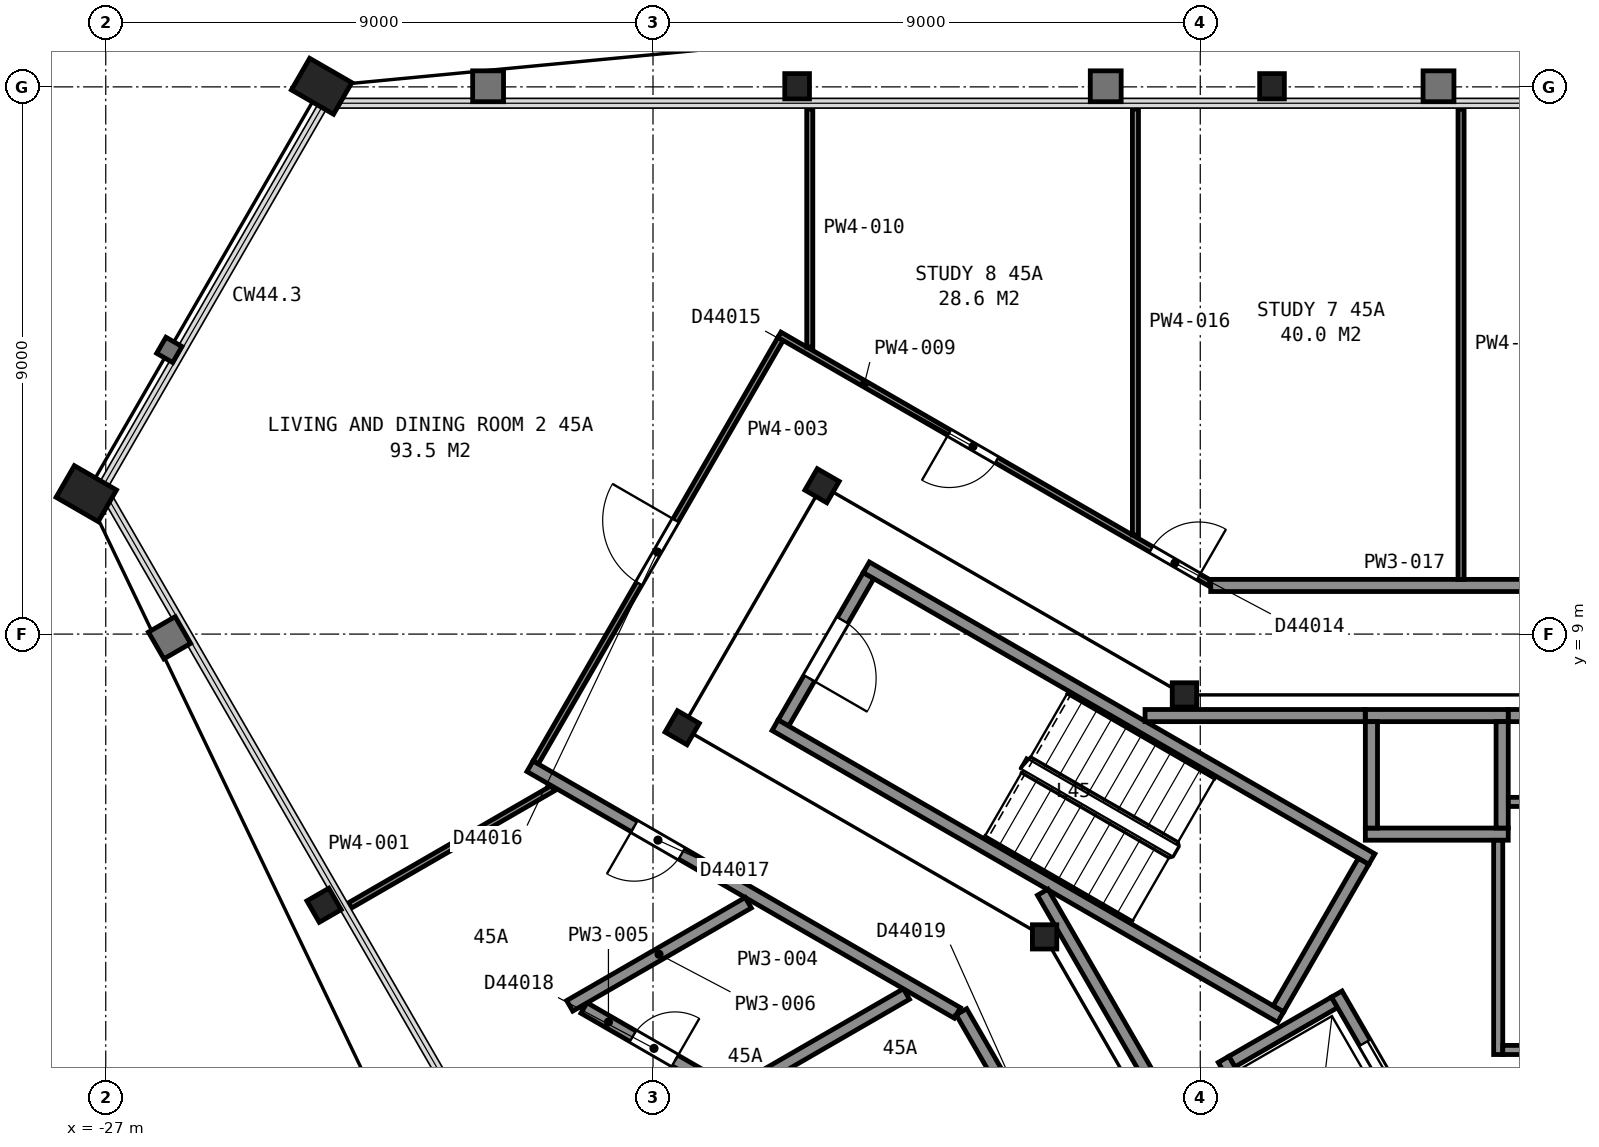
"""IFC4 building model, lengths in metres.
Left out: names, types, materials, properties, quantities, classifications, styles, units other than length and angle.
Written with IfcOpenShell. Run it as: python <this file> out.ifc"""

import sys

from ifc_helpers import new_model, si_unit, direction, frame, frame_2d, origin, origin_2d, place, context, subcontext, project, spatial, rectangle, hollow_rectangle, i_section, extrude, element, fill, save


model = new_model("IFC4")
c1 = context("Model", 3, precision=1e-05, world=origin(), true_north=direction((0.0, 1.0)))
c2 = subcontext(c1, "Body", "Model", "MODEL_VIEW")
j1 = project(units=[si_unit("LENGTHUNIT", "METRE"), si_unit("PLANEANGLEUNIT", "RADIAN")], contexts=[c1])
p1 = place(None, origin())
s1 = spatial("IfcSite", under=j1, at=p1, CompositionType="ELEMENT")
p2 = place(p1, origin())
s2 = spatial("IfcBuilding", under=s1, at=p2, CompositionType="ELEMENT")
p3 = place(p2, frame((0.0, 0.0, 182.1)))
s3 = spatial("IfcBuildingStorey", under=s2, at=p3, CompositionType="ELEMENT", Elevation=182.1)
p4 = place(p3, frame((-7.82, 18.01, 0.0), z_axis=(0.0, 0.0, 1.0), x_axis=(1.0, 0.0, 0.0)))
e1 = element("IfcColumn", 1, at=p4, inside=s3, PredefinedType="COLUMN", context=c2, shape_type="SweptSolid", body=[
    extrude(i_section(OverallWidth=0.406, OverallDepth=0.417, WebThickness=0.03, FlangeThickness=0.048, FilletRadius=0.015, at=origin_2d()), origin(), (0.0, 0.0, 1.0), 3.665),
])
p5 = place(p3, frame((-15.63, 18.01, 0.0), z_axis=(0.0, 0.0, 1.0), x_axis=(1.0, 0.0, 0.0)))
e2 = element("IfcColumn", 2, at=p5, inside=s3, PredefinedType="COLUMN", context=c2, shape_type="SweptSolid", body=[
    extrude(i_section(OverallWidth=0.406, OverallDepth=0.417, WebThickness=0.03, FlangeThickness=0.048, FilletRadius=0.015, at=origin_2d()), origin(), (0.0, 0.0, 1.0), 3.66),
])
for number, where, z_axis, x_axis in (
    (3, (-23.45, 18.01, 0.0), (0.0, 0.0, 1.0), (0.5, 0.866, 0.0)),
    (4, (-27.32, 11.31, 0.0), (0.0, 0.0, 1.0), (0.5, 0.866, 0.0)),
):
    element("IfcColumn", number, at=place(p3, frame(where, z_axis=z_axis, x_axis=x_axis)), inside=s3, PredefinedType="COLUMN", context=c2, shape_type="SweptSolid", body=[
        extrude(hollow_rectangle(XDim=0.6, YDim=0.8, WallThickness=0.05, at=origin_2d()), origin(), (0.0, 0.0, 1.0), 3.635),
    ])
p6 = place(p3, frame((-23.41, 4.54, 0.0), z_axis=(0.0, 0.0, 1.0), x_axis=(-0.5, 0.866025403784, 0.0)))
e5 = element("IfcColumn", 5, at=p6, inside=s3, PredefinedType="COLUMN", context=c2, shape_type="SweptSolid", body=[
    extrude(i_section(OverallWidth=0.406, OverallDepth=0.417, WebThickness=0.03, FlangeThickness=0.048, FilletRadius=0.015, at=origin_2d()), origin(), (0.0, 0.0, 1.0), 3.66),
])
p7 = place(p3, frame((-9.26, 8.0, 0.0), z_axis=(0.0, 0.0, 1.0), x_axis=(1.0, 0.0, 0.0)))
e6 = element("IfcColumn", 6, at=p7, inside=s3, PredefinedType="COLUMN", context=c2, shape_type="SweptSolid", body=[
    extrude(i_section(OverallWidth=0.401, OverallDepth=0.399, WebThickness=0.025, FlangeThickness=0.04, FilletRadius=0.015, at=origin_2d()), origin(), (0.0, 0.0, 1.0), 3.7),
])
for number, where, z_axis, x_axis in (
    (7, (-15.22, 11.44, 0.0), (0.0, 0.0, 1.0), (0.5, 0.866, 0.0)),
    (8, (-17.52, 7.46, 0.0), (0.0, 0.0, 1.0), (0.5, 0.866, 0.0)),
):
    element("IfcColumn", number, at=place(p3, frame(where, z_axis=z_axis, x_axis=x_axis)), inside=s3, PredefinedType="COLUMN", context=c2, shape_type="SweptSolid", body=[
        extrude(i_section(OverallWidth=0.406, OverallDepth=0.417, WebThickness=0.03, FlangeThickness=0.048, FilletRadius=0.015, at=origin_2d()), origin(), (0.0, 0.0, 1.0), 3.7),
    ])
p8 = place(p3, frame((-11.56, 4.02, 0.0), z_axis=(0.0, 0.0, 1.0), x_axis=(1.0, 0.0, 0.0)))
e9 = element("IfcColumn", 9, at=p8, inside=s3, PredefinedType="COLUMN", context=c2, shape_type="SweptSolid", body=[
    extrude(i_section(OverallWidth=0.401, OverallDepth=0.399, WebThickness=0.025, FlangeThickness=0.04, FilletRadius=0.015, at=origin_2d()), origin(), (0.0, 0.0, 1.0), 3.7),
])
p9 = place(p3, frame((-14.455, 9.962, 0.0), z_axis=(0.0, 0.0, 1.0), x_axis=(-0.500049511043, -0.865996816683, 0.0)))
e10 = element("IfcWall", 10, at=p9, inside=s3, PredefinedType="PARTITIONING", context=c2, shape_type="SweptSolid", body=[
    extrude(rectangle(XDim=2.8, YDim=0.2, at=frame_2d((1.4, 0.0))), origin(), (0.0, 0.0, 1.0), 3.45),
])
p10 = place(p9, frame((0.85, 0.0, 0.0)))
e11 = element("IfcOpeningElement", 11, at=p10, cuts=e10, PredefinedType="OPENING", context=c2, shape_type="SweptSolid", body=[
    extrude(rectangle(XDim=1.1, YDim=2.1, at=frame_2d((0.55, 1.05))), frame((0.0, 0.11, 0.0), z_axis=(0.0, -1.0, 0.0), x_axis=(1.0, 0.0, 0.0)), (0.0, 0.0, 1.0), 0.22),
])
for number, where, z_axis, x_axis in (
    (12, (-7.678, 2.701, 0.0), (0.0, 0.0, 1.0), (-0.866, 0.5, 0.0)),
    (13, (-6.178, 5.299, 0.0), (0.0, 0.0, 1.0), (-0.866, 0.5, 0.0)),
):
    element("IfcWall", number, at=place(p3, frame(where, z_axis=z_axis, x_axis=x_axis)), inside=s3, PredefinedType="PARTITIONING", context=c2, shape_type="SweptSolid", body=[
        extrude(rectangle(XDim=9.6, YDim=0.2, at=frame_2d((4.8, 0.0))), origin(), (0.0, 0.0, 1.0), 3.45),
    ])
p11 = place(p3, frame((-6.315, 5.262, 0.0), z_axis=(0.0, 0.0, 1.0), x_axis=(-0.500049511043, -0.865996816683, 0.0)))
e14 = element("IfcWall", 14, at=p11, inside=s3, PredefinedType="PARTITIONING", context=c2, shape_type="SweptSolid", body=[
    extrude(rectangle(XDim=2.8, YDim=0.2, at=frame_2d((1.4, 0.0))), origin(), (0.0, 0.0, 1.0), 3.45),
])
for number, where, z_axis, x_axis in (
    (15, (-6.285, 5.71, 0.0), (0.0, 0.0, 1.0), (1.0, 0.0, 0.0)),
    (16, (-6.285, 7.66, 0.0), (0.0, 0.0, 1.0), (1.0, 0.0, 0.0)),
):
    element("IfcWall", number, at=place(p3, frame(where, z_axis=z_axis, x_axis=x_axis)), inside=s3, PredefinedType="PARTITIONING", context=c2, shape_type="SweptSolid", body=[
        extrude(rectangle(XDim=2.35, YDim=0.2, at=frame_2d((1.175, 0.0))), origin(), (0.0, 0.0, 1.0), 3.7),
    ])
p12 = place(p3, frame((-8.48, 1.969, 0.0), z_axis=(0.0, 0.0, 1.0), x_axis=(0.866000020948, 0.500043961785, 0.0)))
e17 = element("IfcWall", 17, at=p12, inside=s3, PredefinedType="PARTITIONING", context=c2, shape_type="SweptSolid", body=[
    extrude(rectangle(XDim=1.95, YDim=0.2, at=frame_2d((0.975, 0.0))), origin(), (0.0, 0.0, 1.0), 3.7),
])
for number, where, z_axis, x_axis in (
    (18, (-4.035, 5.81, 0.0), (0.0, 0.0, 1.0), (0.0, 1.0, 0.0)),
    (19, (-6.185, 5.81, 0.0), (0.0, 0.0, 1.0), (0.0, 1.0, 0.0)),
):
    element("IfcWall", number, at=place(p3, frame(where, z_axis=z_axis, x_axis=x_axis)), inside=s3, PredefinedType="PARTITIONING", context=c2, shape_type="SweptSolid", body=[
        extrude(rectangle(XDim=1.75, YDim=0.2, at=frame_2d((0.875, 0.0))), origin(), (0.0, 0.0, 1.0), 3.7),
    ])
p13 = place(p3, frame((-5.28, 0.525, 0.0), z_axis=(0.0, 0.0, 1.0), x_axis=(-0.500037662692, 0.866003658127, 0.0)))
e20 = element("IfcWall", 20, at=p13, inside=s3, PredefinedType="PARTITIONING", context=c2, shape_type="SweptSolid", body=[
    extrude(rectangle(XDim=2.95, YDim=0.2, at=frame_2d((1.475, 0.0))), origin(), (0.0, 0.0, 1.0), 3.7),
])
p14 = place(p13, frame((0.925, 0.0, 0.0)))
e21 = element("IfcOpeningElement", 21, at=p14, cuts=e20, PredefinedType="OPENING", context=c2, shape_type="SweptSolid", body=[
    extrude(rectangle(XDim=1.1, YDim=2.1, at=frame_2d((0.55, 1.05))), frame((0.0, 0.11, 0.0), z_axis=(0.0, -1.0, 0.0), x_axis=(1.0, 0.0, 0.0)), (0.0, 0.0, 1.0), 0.22),
])
p15 = place(p3, frame((-7.242, -0.376, 0.0), z_axis=(0.0, 0.0, 1.0), x_axis=(-0.499996545922, 0.866027397988, 0.0)))
e22 = element("IfcWall", 22, at=p15, inside=s3, PredefinedType="PARTITIONING", context=c2, shape_type="SweptSolid", body=[
    extrude(rectangle(XDim=2.75, YDim=0.2, at=frame_2d((1.375, 0.0))), origin(), (0.0, 0.0, 1.0), 3.7),
])
p16 = place(p3, frame((-11.591, 4.755, 0.0), z_axis=(0.0, 0.0, 1.0), x_axis=(0.500043977787, -0.866000011708, 0.0)))
e23 = element("IfcWall", 23, at=p16, inside=s3, PredefinedType="PARTITIONING", context=c2, shape_type="SweptSolid", body=[
    extrude(rectangle(XDim=6.617, YDim=0.2, at=frame_2d((3.308, 0.0))), origin(), (0.0, 0.0, 1.0), 3.45),
])
p17 = place(p16, frame((3.695, 0.0, 0.0)))
e24 = element("IfcOpeningElement", 24, at=p17, cuts=e23, PredefinedType="OPENING", context=c2, shape_type="SweptSolid", body=[
    extrude(rectangle(XDim=1.8, YDim=2.1, at=frame_2d((0.9, 1.05))), frame((0.0, 0.11, 0.0), z_axis=(0.0, -1.0, 0.0), x_axis=(1.0, 0.0, 0.0)), (0.0, 0.0, 1.0), 0.22),
])
p18 = place(p3, frame((-9.908, 7.66, 0.0), z_axis=(0.0, 0.0, 1.0), x_axis=(1.0, 0.0, 0.0)))
e25 = element("IfcWall", 25, at=p18, inside=s3, PredefinedType="PARTITIONING", context=c2, shape_type="SweptSolid", body=[
    extrude(rectangle(XDim=3.621, YDim=0.2, at=frame_2d((1.811, 0.0))), origin(), (0.0, 0.0, 1.0), 3.45),
])
p19 = place(p3, frame((-4.1, 2.085, 0.0), z_axis=(0.0, 0.0, 1.0), x_axis=(0.0, 1.0, 0.0)))
e26 = element("IfcWall", 26, at=p19, inside=s3, PredefinedType="PARTITIONING", context=c2, shape_type="SweptSolid", body=[
    extrude(rectangle(XDim=3.523, YDim=0.15, at=frame_2d((1.761, 0.0))), origin(), (0.0, 0.0, 1.0), 3.45),
])
p20 = place(p3, frame((-4.025, 2.16, 0.0), z_axis=(0.0, 0.0, 1.0), x_axis=(1.0, 0.0, 0.0)))
e27 = element("IfcWall", 27, at=p20, inside=s3, PredefinedType="PARTITIONING", context=c2, shape_type="SweptSolid", body=[
    extrude(rectangle(XDim=1.238, YDim=0.15, at=frame_2d((0.619, 0.0))), origin(), (0.0, 0.0, 1.0), 3.45),
])
p21 = place(p3, frame((-3.933, 6.24, 0.0), z_axis=(0.0, 0.0, 1.0), x_axis=(1.0, 0.0, 0.0)))
e28 = element("IfcWall", 28, at=p21, inside=s3, PredefinedType="PARTITIONING", context=c2, shape_type="SweptSolid", body=[
    extrude(rectangle(XDim=3.538, YDim=0.15, at=frame_2d((1.769, 0.0))), origin(), (0.0, 0.0, 1.0), 3.45),
])
p22 = place(p21, frame((1.3, 0.0, 0.0)))
e29 = element("IfcOpeningElement", 29, at=p22, cuts=e28, PredefinedType="OPENING", context=c2, shape_type="SweptSolid", body=[
    extrude(rectangle(XDim=1.0, YDim=2.1, at=frame_2d((0.5, 1.05))), frame((0.0, 0.085, 0.0), z_axis=(0.0, -1.0, 0.0), x_axis=(1.0, 0.0, 0.0)), (0.0, 0.0, 1.0), 0.17),
])
p23 = place(p3, frame((-3.933, 7.66, 0.0), z_axis=(0.0, 0.0, 1.0), x_axis=(1.0, 0.0, 0.0)))
e30 = element("IfcWall", 30, at=p23, inside=s3, PredefinedType="PARTITIONING", context=c2, shape_type="SweptSolid", body=[
    extrude(rectangle(XDim=13.841, YDim=0.2, at=frame_2d((6.92, 0.0))), origin(), (0.0, 0.0, 1.0), 3.45),
])
p24 = place(p3, frame((-22.983, 4.538, 0.0), z_axis=(0.0, 0.0, 1.0), x_axis=(0.865988254995, 0.500064338071, 0.0)))
e31 = element("IfcWall", 31, at=p24, inside=s3, PredefinedType="PARTITIONING", context=c2, shape_type="SweptSolid", body=[
    extrude(rectangle(XDim=3.853, YDim=0.1, at=frame_2d((1.927, 0.0))), origin(), (0.0, 0.0, 1.0), 2.713),
])
p25 = place(p3, frame((-20.064, -0.518, 0.0), z_axis=(0.0, 0.0, 1.0), x_axis=(0.865994046034, 0.500054309285, 0.0)))
e32 = element("IfcWall", 32, at=p25, inside=s3, PredefinedType="PARTITIONING", context=c2, shape_type="SweptSolid", body=[
    extrude(rectangle(XDim=7.196, YDim=0.2, at=frame_2d((3.598, 0.0))), origin(), (0.0, 0.0, 1.0), 2.713),
])
p26 = place(p3, frame((-19.93, 6.888, 0.0), z_axis=(0.0, 0.0, 1.0), x_axis=(0.500413056211, 0.865786794294, 0.0)))
e33 = element("IfcWall", 33, at=p26, inside=s3, PredefinedType="PARTITIONING", context=c2, shape_type="SweptSolid", body=[
    extrude(rectangle(XDim=8.047, YDim=0.1, at=frame_2d((4.023, 0.0))), origin(), (0.0, 0.0, 1.0), 2.713),
])
p27 = place(p26, frame((3.4, 0.0, 0.0)))
e34 = element("IfcOpeningElement", 34, at=p27, cuts=e33, PredefinedType="OPENING", context=c2, shape_type="SweptSolid", body=[
    extrude(rectangle(XDim=1.2, YDim=2.1, at=frame_2d((0.6, 1.05))), frame((0.0, 0.06, 0.0), z_axis=(0.0, -1.0, 0.0), x_axis=(1.0, 0.0, 0.0)), (0.0, 0.0, 1.0), 0.12),
])
p28 = place(p3, frame((-12.995, 2.77, 0.0), z_axis=(0.0, 0.0, 1.0), x_axis=(-0.866100425926, 0.499870035319, 0.0)))
e35 = element("IfcWall", 35, at=p28, inside=s3, PredefinedType="PARTITIONING", context=c2, shape_type="SweptSolid", body=[
    extrude(rectangle(XDim=8.115, YDim=0.2, at=frame_2d((4.058, 0.0))), origin(), (0.0, 0.0, 1.0), 2.713),
])
p29 = place(p28, frame((5.235, 0.0, 0.0)))
e36 = element("IfcOpeningElement", 36, at=p29, cuts=e35, PredefinedType="OPENING", context=c2, shape_type="SweptSolid", body=[
    extrude(rectangle(XDim=0.9, YDim=2.1, at=frame_2d((0.45, 1.05))), frame((0.0, 0.11, 0.0), z_axis=(0.0, -1.0, 0.0), x_axis=(1.0, 0.0, 0.0)), (0.0, 0.0, 1.0), 0.22),
])
p30 = place(p3, frame((-19.136, 2.851, 0.0), z_axis=(0.0, 0.0, 1.0), x_axis=(0.866008217664, -0.500029766052, 0.0)))
e37 = element("IfcWall", 37, at=p30, inside=s3, PredefinedType="PARTITIONING", context=c2, shape_type="SweptSolid", body=[
    extrude(rectangle(XDim=2.659, YDim=0.2, at=frame_2d((1.33, 0.0))), origin(), (0.0, 0.0, 1.0), 2.713),
])
p31 = place(p30, frame((0.93, 0.0, 0.0)))
e38 = element("IfcOpeningElement", 38, at=p31, cuts=e37, PredefinedType="OPENING", context=c2, shape_type="SweptSolid", body=[
    extrude(rectangle(XDim=0.8, YDim=2.1, at=frame_2d((0.4, 1.05))), frame((0.0, 0.11, 0.0), z_axis=(0.0, -1.0, 0.0), x_axis=(1.0, 0.0, 0.0)), (0.0, 0.0, 1.0), 0.22),
])
p32 = place(p3, frame((-19.37, 2.886, 0.0), z_axis=(0.0, 0.0, 1.0), x_axis=(0.866036909293, 0.499980071345, 0.0)))
e39 = element("IfcWall", 39, at=p32, inside=s3, PredefinedType="PARTITIONING", context=c2, shape_type="SweptSolid", body=[
    extrude(rectangle(XDim=3.391, YDim=0.2, at=frame_2d((1.695, 0.0))), origin(), (0.0, 0.0, 1.0), 2.713),
])
p33 = place(p3, frame((-15.921, 13.923, 0.0), z_axis=(0.0, 0.0, 1.0), x_axis=(0.866088973199, -0.499889878377, 0.0)))
e40 = element("IfcWall", 40, at=p33, inside=s3, PredefinedType="PARTITIONING", context=c2, shape_type="SweptSolid", body=[
    extrude(rectangle(XDim=8.163, YDim=0.1, at=frame_2d((4.082, 0.0))), origin(), (0.0, 0.0, 1.0), 2.713),
])
p34 = place(p33, frame((7.06, 0.0, 0.0)))
e41 = element("IfcOpeningElement", 41, at=p34, cuts=e40, PredefinedType="OPENING", context=c2, shape_type="SweptSolid", body=[
    extrude(rectangle(XDim=0.9, YDim=2.1, at=frame_2d((0.45, 1.05))), frame((0.0, 0.06, 0.0), z_axis=(0.0, -1.0, 0.0), x_axis=(1.0, 0.0, 0.0)), (0.0, 0.0, 1.0), 0.12),
])
p35 = place(p33, frame((3.226, 0.0, 0.0)))
e42 = element("IfcOpeningElement", 42, at=p35, cuts=e40, PredefinedType="OPENING", context=c2, shape_type="SweptSolid", body=[
    extrude(rectangle(XDim=0.9, YDim=2.1, at=frame_2d((0.45, 1.05))), frame((0.0, 0.06, 0.0), z_axis=(0.0, -1.0, 0.0), x_axis=(1.0, 0.0, 0.0)), (0.0, 0.0, 1.0), 0.12),
])
p36 = place(p3, frame((-15.422, 13.722, 0.0), z_axis=(0.0, 0.0, 1.0), x_axis=(0.0, 1.0, 0.0)))
e43 = element("IfcWall", 43, at=p36, inside=s3, PredefinedType="PARTITIONING", context=c2, shape_type="SweptSolid", body=[
    extrude(rectangle(XDim=3.913, YDim=0.1, at=frame_2d((1.957, 0.0))), origin(), (0.0, 0.0, 1.0), 2.713),
])
p37 = place(p3, frame((-4.075, -12.545, 0.0), z_axis=(0.0, 0.0, 1.0), x_axis=(-0.499997769292, 0.86602669168, 0.0)))
e44 = element("IfcWall", 44, at=p37, inside=s3, PredefinedType="PARTITIONING", context=c2, shape_type="SweptSolid", body=[
    extrude(rectangle(XDim=17.706, YDim=0.2, at=frame_2d((8.853, 0.0))), origin(), (0.0, 0.0, 1.0), 2.713),
])
p38 = place(p37, frame((14.46, 0.0, 0.0)))
e45 = element("IfcOpeningElement", 45, at=p38, cuts=e44, PredefinedType="OPENING", context=c2, shape_type="SweptSolid", body=[
    extrude(rectangle(XDim=0.9, YDim=2.1, at=frame_2d((0.45, 1.05))), frame((0.0, 0.11, 0.0), z_axis=(0.0, -1.0, 0.0), x_axis=(1.0, 0.0, 0.0)), (0.0, 0.0, 1.0), 0.22),
])
p39 = place(p37, frame((10.896, 0.0, 0.0)))
e46 = element("IfcOpeningElement", 46, at=p39, cuts=e44, PredefinedType="OPENING", context=c2, shape_type="SweptSolid", body=[
    extrude(rectangle(XDim=0.9, YDim=2.1, at=frame_2d((0.45, 1.05))), frame((0.0, 0.11, 0.0), z_axis=(0.0, -1.0, 0.0), x_axis=(1.0, 0.0, 0.0)), (0.0, 0.0, 1.0), 0.22),
])
p40 = place(p37, frame((6.068, 0.0, 0.0)))
e47 = element("IfcOpeningElement", 47, at=p40, cuts=e44, PredefinedType="OPENING", context=c2, shape_type="SweptSolid", body=[
    extrude(rectangle(XDim=0.9, YDim=2.1, at=frame_2d((0.45, 1.05))), frame((0.0, 0.11, 0.0), z_axis=(0.0, -1.0, 0.0), x_axis=(1.0, 0.0, 0.0)), (0.0, 0.0, 1.0), 0.22),
])
p41 = place(p3, frame((-10.066, 10.631, 0.0), z_axis=(0.0, 0.0, 1.0), x_axis=(0.0, 1.0, 0.0)))
e48 = element("IfcWall", 48, at=p41, inside=s3, PredefinedType="PARTITIONING", context=c2, shape_type="SweptSolid", body=[
    extrude(rectangle(XDim=7.004, YDim=0.1, at=frame_2d((3.502, 0.0))), origin(), (0.0, 0.0, 1.0), 2.713),
])
p42 = place(p3, frame((-8.828, 9.8, 0.0), z_axis=(0.0, 0.0, 1.0), x_axis=(1.0, 0.0, 0.0)))
e49 = element("IfcWall", 49, at=p42, inside=s3, PredefinedType="PARTITIONING", context=c2, shape_type="SweptSolid", body=[
    extrude(rectangle(XDim=17.656, YDim=0.2, at=frame_2d((8.828, 0.0))), origin(), (0.0, 0.0, 1.0), 2.713),
])
p43 = place(p42, frame((11.723, 0.0, 0.0)))
e50 = element("IfcOpeningElement", 50, at=p43, cuts=e49, PredefinedType="OPENING", context=c2, shape_type="SweptSolid", body=[
    extrude(rectangle(XDim=0.9, YDim=2.1, at=frame_2d((0.45, 1.05))), frame((0.0, 0.11, 0.0), z_axis=(0.0, -1.0, 0.0), x_axis=(1.0, 0.0, 0.0)), (0.0, 0.0, 1.0), 0.22),
])
p44 = place(p42, frame((6.367, 0.0, 0.0)))
e51 = element("IfcOpeningElement", 51, at=p44, cuts=e49, PredefinedType="OPENING", context=c2, shape_type="SweptSolid", body=[
    extrude(rectangle(XDim=0.9, YDim=2.1, at=frame_2d((0.45, 1.05))), frame((0.0, 0.11, 0.0), z_axis=(0.0, -1.0, 0.0), x_axis=(1.0, 0.0, 0.0)), (0.0, 0.0, 1.0), 0.22),
])
p45 = place(p3, frame((-4.711, 9.9, 0.0), z_axis=(0.0, 0.0, 1.0), x_axis=(0.0, 1.0, 0.0)))
e52 = element("IfcWall", 52, at=p45, inside=s3, PredefinedType="PARTITIONING", context=c2, shape_type="SweptSolid", body=[
    extrude(rectangle(XDim=7.735, YDim=0.1, at=frame_2d((3.868, 0.0))), origin(), (0.0, 0.0, 1.0), 2.713),
])
p46 = place(p10, origin())
e53 = element("IfcDoor", 53, at=p46, inside=s3, OperationType="SINGLE_SWING_RIGHT", PredefinedType="DOOR", context=c2, shape_type="SweptSolid", body=[
    extrude(rectangle(XDim=1.1, YDim=2.1, at=frame_2d((0.55, 1.05))), frame((0.0, 0.025, 0.0), z_axis=(0.0, -1.0, 0.0), x_axis=(1.0, 0.0, 0.0)), (0.0, 0.0, 1.0), 0.05),
])
fill(e11, e53)
p47 = place(p14, origin())
e54 = element("IfcDoor", 54, at=p47, inside=s3, OperationType="SLIDING_TO_LEFT", PredefinedType="DOOR", context=c2, shape_type="SweptSolid", body=[
    extrude(rectangle(XDim=1.1, YDim=2.1, at=frame_2d((0.55, 1.05))), frame((0.0, 0.025, 0.0), z_axis=(0.0, -1.0, 0.0), x_axis=(1.0, 0.0, 0.0)), (0.0, 0.0, 1.0), 0.05),
])
fill(e21, e54)
p48 = place(p27, origin())
e55 = element("IfcDoor", 55, at=p48, inside=s3, OperationType="SINGLE_SWING_RIGHT", PredefinedType="DOOR", context=c2, shape_type="SweptSolid", body=[
    extrude(rectangle(XDim=1.2, YDim=2.1, at=frame_2d((0.6, 1.05))), frame((0.0, 0.025, 0.0), z_axis=(0.0, -1.0, 0.0), x_axis=(1.0, 0.0, 0.0)), (0.0, 0.0, 1.0), 0.05),
])
fill(e34, e55)
p49 = place(p29, origin())
e56 = element("IfcDoor", 56, at=p49, inside=s3, OperationType="SINGLE_SWING_RIGHT", PredefinedType="DOOR", context=c2, shape_type="SweptSolid", body=[
    extrude(rectangle(XDim=0.9, YDim=2.1, at=frame_2d((0.45, 1.05))), frame((0.0, 0.025, 0.0), z_axis=(0.0, -1.0, 0.0), x_axis=(1.0, 0.0, 0.0)), (0.0, 0.0, 1.0), 0.05),
])
fill(e36, e56)
p50 = place(p31, origin())
e57 = element("IfcDoor", 57, at=p50, inside=s3, OperationType="SINGLE_SWING_RIGHT", PredefinedType="DOOR", context=c2, shape_type="SweptSolid", body=[
    extrude(rectangle(XDim=0.8, YDim=2.1, at=frame_2d((0.4, 1.05))), frame((0.0, 0.025, 0.0), z_axis=(0.0, -1.0, 0.0), x_axis=(1.0, 0.0, 0.0)), (0.0, 0.0, 1.0), 0.05),
])
fill(e38, e57)
p51 = place(p34, origin())
e58 = element("IfcDoor", 58, at=p51, inside=s3, OperationType="SINGLE_SWING_RIGHT", PredefinedType="DOOR", context=c2, shape_type="SweptSolid", body=[
    extrude(rectangle(XDim=0.9, YDim=2.1, at=frame_2d((0.45, 1.05))), frame((0.0, 0.025, 0.0), z_axis=(0.0, -1.0, 0.0), x_axis=(1.0, 0.0, 0.0)), (0.0, 0.0, 1.0), 0.05),
])
fill(e41, e58)
p52 = place(p35, origin())
e59 = element("IfcDoor", 59, at=p52, inside=s3, OperationType="SINGLE_SWING_LEFT", PredefinedType="DOOR", context=c2, shape_type="SweptSolid", body=[
    extrude(rectangle(XDim=0.9, YDim=2.1, at=frame_2d((0.45, 1.05))), frame((0.0, 0.025, 0.0), z_axis=(0.0, -1.0, 0.0), x_axis=(1.0, 0.0, 0.0)), (0.0, 0.0, 1.0), 0.05),
])
fill(e42, e59)
save(model, sys.argv[1])
